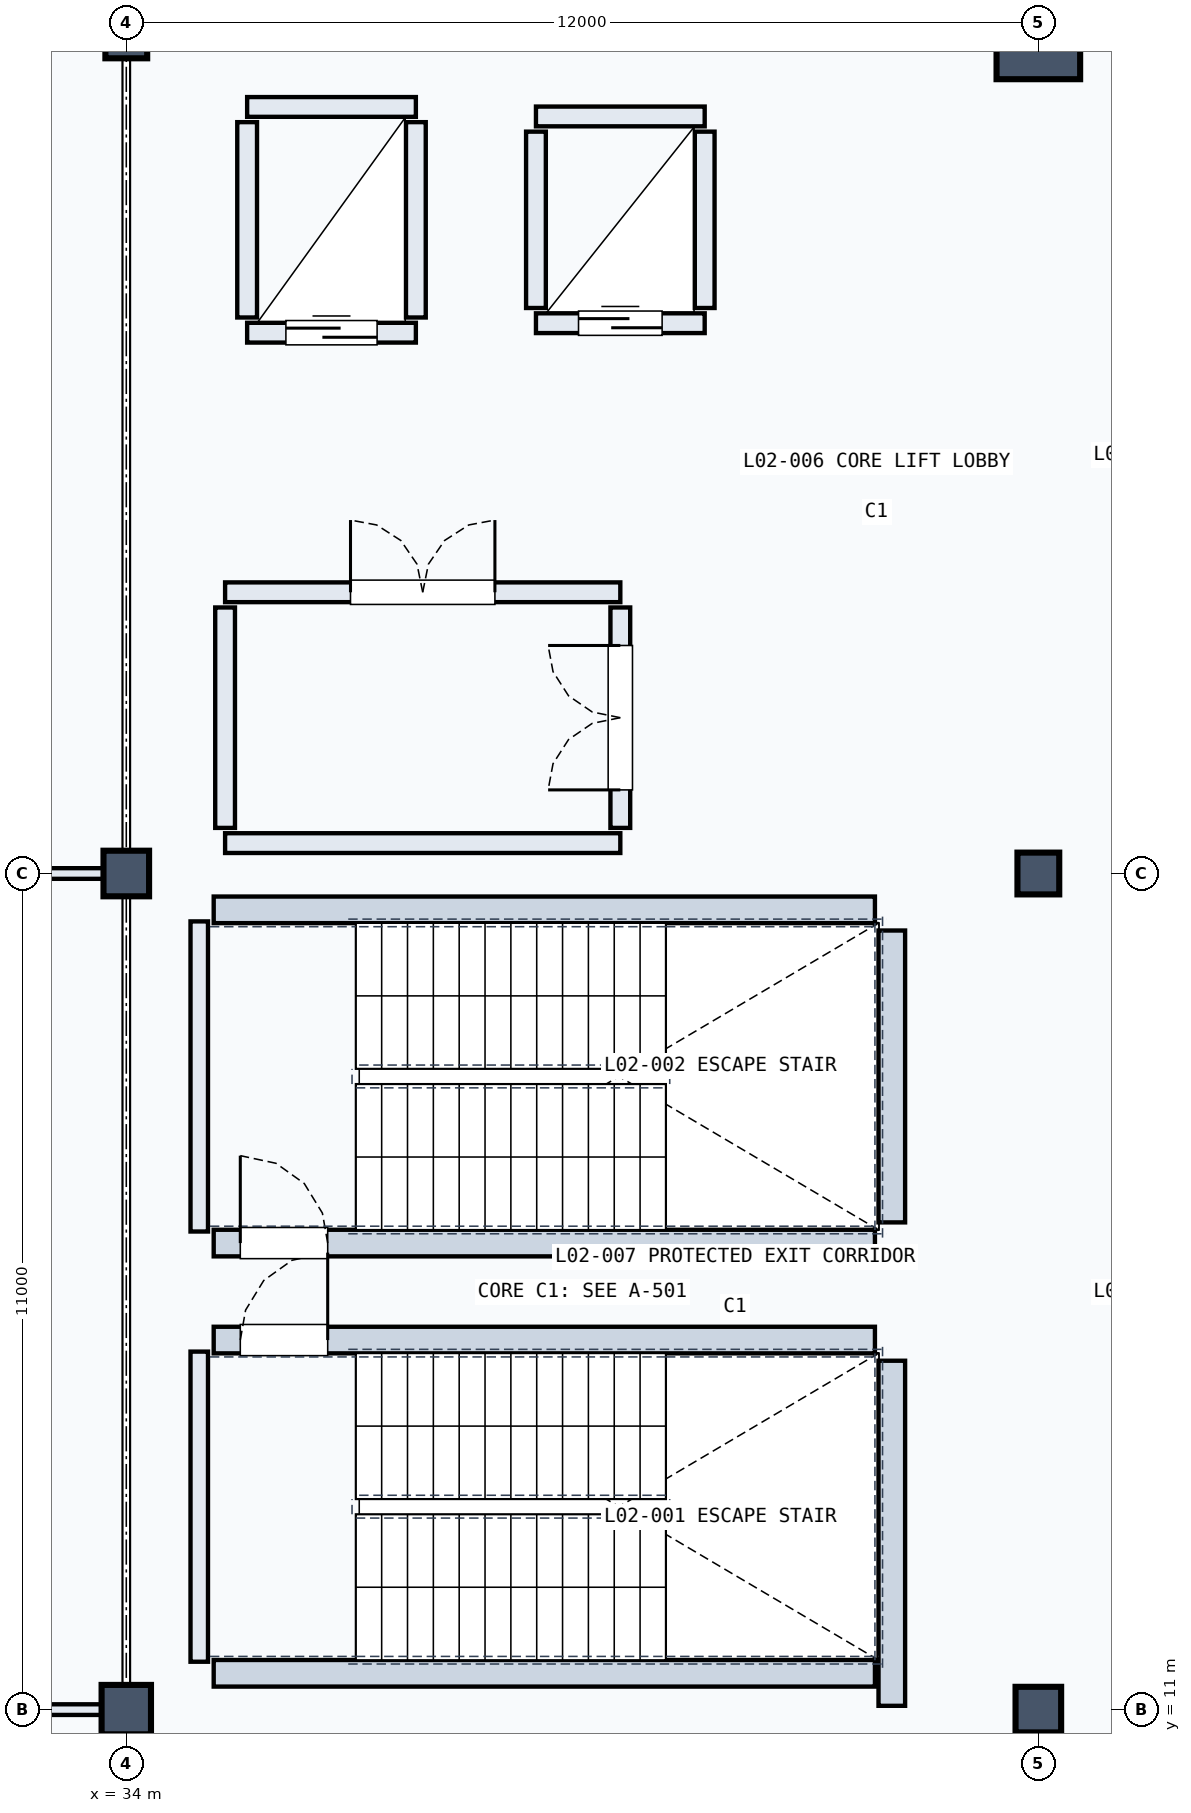
"""IFC4 building model, lengths in metres.
Left out: names, types, materials, properties, quantities, classifications, styles, units other than length and angle.
Written with IfcOpenShell. Run it as: python <this file> out.ifc"""

import sys

from ifc_helpers import new_model, si_unit, direction, frame, frame_2d, origin, origin_2d, place, context, subcontext, project, spatial, rectangle, extrude, element, fill, save


model = new_model("IFC4")
c1 = context("Model", 3, precision=1e-05, world=origin(), true_north=direction((0.0, 1.0)))
c2 = subcontext(c1, "Body", "Model", "MODEL_VIEW")
j1 = project(units=[si_unit("LENGTHUNIT", "METRE"), si_unit("PLANEANGLEUNIT", "RADIAN")], contexts=[c1])
p1 = place(None, origin())
s1 = spatial("IfcSite", under=j1, at=p1, CompositionType="ELEMENT")
p2 = place(p1, origin())
s2 = spatial("IfcBuilding", under=s1, at=p2, CompositionType="ELEMENT")
p3 = place(p2, frame((0.0, 0.0, 10.2)))
s3 = spatial("IfcBuildingStorey", under=s2, at=p3, CompositionType="ELEMENT", Elevation=10.2)
p4 = place(p3, frame((34.0, 11.0, 0.0), z_axis=(0.0, 0.0, 1.0), x_axis=(1.0, 0.0, 0.0)))
e1 = element("IfcColumn", 1, at=p4, inside=s3, PredefinedType="COLUMN", context=c2, shape_type="SweptSolid", body=[
    extrude(rectangle(XDim=0.65, YDim=0.65, at=origin_2d()), origin(), (0.0, 0.0, 1.0), 4.5),
])
p5 = place(p3, frame((34.0, 22.0, 0.0), z_axis=(0.0, 0.0, 1.0), x_axis=(1.0, 0.0, 0.0)))
e2 = element("IfcColumn", 2, at=p5, inside=s3, PredefinedType="COLUMN", context=c2, shape_type="SweptSolid", body=[
    extrude(rectangle(XDim=0.6, YDim=0.6, at=origin_2d()), origin(), (0.0, 0.0, 1.0), 4.5),
])
p6 = place(p3, frame((34.0, 33.0, 0.0), z_axis=(0.0, 0.0, 1.0), x_axis=(1.0, 0.0, 0.0)))
e3 = element("IfcColumn", 3, at=p6, inside=s3, PredefinedType="COLUMN", context=c2, shape_type="SweptSolid", body=[
    extrude(rectangle(XDim=0.55, YDim=0.55, at=origin_2d()), origin(), (0.0, 0.0, 1.0), 4.5),
])
p7 = place(p3, frame((46.0, 11.0, 0.0), z_axis=(0.0, 0.0, 1.0), x_axis=(1.0, 0.0, 0.0)))
e4 = element("IfcColumn", 4, at=p7, inside=s3, PredefinedType="COLUMN", context=c2, shape_type="SweptSolid", body=[
    extrude(rectangle(XDim=0.6, YDim=0.6, at=origin_2d()), origin(), (0.0, 0.0, 1.0), 4.5),
])
p8 = place(p3, frame((46.0, 22.0, 0.0), z_axis=(0.0, 0.0, 1.0), x_axis=(1.0, 0.0, 0.0)))
e5 = element("IfcColumn", 5, at=p8, inside=s3, PredefinedType="COLUMN", context=c2, shape_type="SweptSolid", body=[
    extrude(rectangle(XDim=0.55, YDim=0.55, at=origin_2d()), origin(), (0.0, 0.0, 1.0), 4.5),
])
p9 = place(p3, frame((46.0, 33.0, 0.0), z_axis=(0.0, 0.0, 1.0), x_axis=(1.0, 0.0, 0.0)))
e6 = element("IfcColumn", 6, at=p9, inside=s3, PredefinedType="COLUMN", context=c2, shape_type="SweptSolid", body=[
    extrude(rectangle(XDim=1.1, YDim=1.1, at=origin_2d()), origin(), (0.0, 0.0, 1.0), 4.5),
])
p10 = place(p3, frame((34.96, 11.63, 0.0), z_axis=(0.0, 0.0, 1.0), x_axis=(0.0, 1.0, 0.0)))
e7 = element("IfcWall", 7, at=p10, inside=s3, PredefinedType="SOLIDWALL", context=c2, shape_type="SweptSolid", body=[
    extrude(rectangle(XDim=4.08, YDim=0.23, at=frame_2d((2.04, 0.0))), origin(), (0.0, 0.0, 1.0), 4.14),
])
p11 = place(p3, frame((44.072, 11.05, 0.0), z_axis=(0.0, 0.0, 1.0), x_axis=(0.0, 1.0, 0.0)))
e8 = element("IfcWall", 8, at=p11, inside=s3, PredefinedType="SOLIDWALL", context=c2, shape_type="SweptSolid", body=[
    extrude(rectangle(XDim=4.54, YDim=0.35, at=frame_2d((2.27, 0.0))), origin(), (0.0, 0.0, 1.0), 4.14),
])
p12 = place(p3, frame((35.15, 11.478, 0.0), z_axis=(0.0, 0.0, 1.0), x_axis=(1.0, 0.0, 0.0)))
e9 = element("IfcWall", 9, at=p12, inside=s3, PredefinedType="SOLIDWALL", context=c2, shape_type="SweptSolid", body=[
    extrude(rectangle(XDim=8.7, YDim=0.35, at=frame_2d((4.35, 0.0))), origin(), (0.0, 0.0, 1.0), 4.14),
])
p13 = place(p3, frame((35.15, 15.862, 0.0), z_axis=(0.0, 0.0, 1.0), x_axis=(1.0, 0.0, 0.0)))
e10 = element("IfcWall", 10, at=p13, inside=s3, PredefinedType="SOLIDWALL", context=c2, shape_type="SweptSolid", body=[
    extrude(rectangle(XDim=8.7, YDim=0.35, at=frame_2d((4.35, 0.0))), origin(), (0.0, 0.0, 1.0), 4.14),
])
p14 = place(p13, frame((0.35, 0.0, 0.0)))
e11 = element("IfcOpeningElement", 11, at=p14, cuts=e10, PredefinedType="OPENING", context=c2, shape_type="SweptSolid", body=[
    extrude(rectangle(XDim=1.15, YDim=2.2, at=frame_2d((0.575, 1.1))), frame((0.0, 0.185, 0.0), z_axis=(0.0, -1.0, 0.0), x_axis=(1.0, 0.0, 0.0)), (0.0, 0.0, 1.0), 0.37),
])
p15 = place(p3, frame((34.96, 17.29, 0.0), z_axis=(0.0, 0.0, 1.0), x_axis=(0.0, 1.0, 0.0)))
e12 = element("IfcWall", 12, at=p15, inside=s3, PredefinedType="SOLIDWALL", context=c2, shape_type="SweptSolid", body=[
    extrude(rectangle(XDim=4.08, YDim=0.23, at=frame_2d((2.04, 0.0))), origin(), (0.0, 0.0, 1.0), 4.14),
])
p16 = place(p3, frame((44.072, 17.41, 0.0), z_axis=(0.0, 0.0, 1.0), x_axis=(0.0, 1.0, 0.0)))
e13 = element("IfcWall", 13, at=p16, inside=s3, PredefinedType="SOLIDWALL", context=c2, shape_type="SweptSolid", body=[
    extrude(rectangle(XDim=3.84, YDim=0.35, at=frame_2d((1.92, 0.0))), origin(), (0.0, 0.0, 1.0), 4.14),
])
p17 = place(p3, frame((35.15, 17.138, 0.0), z_axis=(0.0, 0.0, 1.0), x_axis=(1.0, 0.0, 0.0)))
e14 = element("IfcWall", 14, at=p17, inside=s3, PredefinedType="SOLIDWALL", context=c2, shape_type="SweptSolid", body=[
    extrude(rectangle(XDim=8.7, YDim=0.35, at=frame_2d((4.35, 0.0))), origin(), (0.0, 0.0, 1.0), 4.14),
])
p18 = place(p17, frame((0.35, 0.0, 0.0)))
e15 = element("IfcOpeningElement", 15, at=p18, cuts=e14, PredefinedType="OPENING", context=c2, shape_type="SweptSolid", body=[
    extrude(rectangle(XDim=1.15, YDim=2.2, at=frame_2d((0.575, 1.1))), frame((0.0, 0.185, 0.0), z_axis=(0.0, -1.0, 0.0), x_axis=(1.0, 0.0, 0.0)), (0.0, 0.0, 1.0), 0.37),
])
p19 = place(p3, frame((35.15, 21.522, 0.0), z_axis=(0.0, 0.0, 1.0), x_axis=(1.0, 0.0, 0.0)))
e16 = element("IfcWall", 16, at=p19, inside=s3, PredefinedType="SOLIDWALL", context=c2, shape_type="SweptSolid", body=[
    extrude(rectangle(XDim=8.7, YDim=0.35, at=frame_2d((4.35, 0.0))), origin(), (0.0, 0.0, 1.0), 4.14),
])
p20 = place(p3, frame((35.59, 29.115, 0.0), z_axis=(0.0, 0.0, 1.0), x_axis=(1.0, 0.0, 0.0)))
e17 = element("IfcWall", 17, at=p20, inside=s3, PredefinedType="SOLIDWALL", context=c2, shape_type="SweptSolid", body=[
    extrude(rectangle(XDim=2.22, YDim=0.26, at=frame_2d((1.11, 0.0))), origin(), (0.0, 0.0, 1.0), 4.14),
])
p21 = place(p20, frame((0.51, 0.0, 0.0)))
e18 = element("IfcOpeningElement", 18, at=p21, cuts=e17, PredefinedType="OPENING", context=c2, shape_type="SweptSolid", body=[
    extrude(rectangle(XDim=1.2, YDim=2.2, at=frame_2d((0.6, 1.1))), frame((0.0, 0.14, 0.0), z_axis=(0.0, -1.0, 0.0), x_axis=(1.0, 0.0, 0.0)), (0.0, 0.0, 1.0), 0.28),
])
p22 = place(p3, frame((35.59, 32.085, 0.0), z_axis=(0.0, 0.0, 1.0), x_axis=(1.0, 0.0, 0.0)))
e19 = element("IfcWall", 19, at=p22, inside=s3, PredefinedType="SOLIDWALL", context=c2, shape_type="SweptSolid", body=[
    extrude(rectangle(XDim=2.22, YDim=0.26, at=frame_2d((1.11, 0.0))), origin(), (0.0, 0.0, 1.0), 4.14),
])
for number, where, z_axis, x_axis in (
    (20, (35.59, 29.315, 0.0), (0.0, 0.0, 1.0), (0.0, 1.0, 0.0)),
    (21, (37.81, 29.315, 0.0), (0.0, 0.0, 1.0), (0.0, 1.0, 0.0)),
):
    element("IfcWall", number, at=place(p3, frame(where, z_axis=z_axis, x_axis=x_axis)), inside=s3, PredefinedType="SOLIDWALL", context=c2, shape_type="SweptSolid", body=[
        extrude(rectangle(XDim=2.57, YDim=0.26, at=frame_2d((1.285, 0.0))), origin(), (0.0, 0.0, 1.0), 4.14),
    ])
p23 = place(p3, frame((39.39, 29.24, 0.0), z_axis=(0.0, 0.0, 1.0), x_axis=(1.0, 0.0, 0.0)))
e22 = element("IfcWall", 22, at=p23, inside=s3, PredefinedType="SOLIDWALL", context=c2, shape_type="SweptSolid", body=[
    extrude(rectangle(XDim=2.22, YDim=0.26, at=frame_2d((1.11, 0.0))), origin(), (0.0, 0.0, 1.0), 4.14),
])
p24 = place(p23, frame((0.56, 0.0, 0.0)))
e23 = element("IfcOpeningElement", 23, at=p24, cuts=e22, PredefinedType="OPENING", context=c2, shape_type="SweptSolid", body=[
    extrude(rectangle(XDim=1.1, YDim=2.15, at=frame_2d((0.55, 1.075))), frame((0.0, 0.14, 0.0), z_axis=(0.0, -1.0, 0.0), x_axis=(1.0, 0.0, 0.0)), (0.0, 0.0, 1.0), 0.28),
])
p25 = place(p3, frame((39.39, 31.96, 0.0), z_axis=(0.0, 0.0, 1.0), x_axis=(1.0, 0.0, 0.0)))
e24 = element("IfcWall", 24, at=p25, inside=s3, PredefinedType="SOLIDWALL", context=c2, shape_type="SweptSolid", body=[
    extrude(rectangle(XDim=2.22, YDim=0.26, at=frame_2d((1.11, 0.0))), origin(), (0.0, 0.0, 1.0), 4.14),
])
for number, where, z_axis, x_axis in (
    (25, (39.39, 29.44, 0.0), (0.0, 0.0, 1.0), (0.0, 1.0, 0.0)),
    (26, (41.61, 29.44, 0.0), (0.0, 0.0, 1.0), (0.0, 1.0, 0.0)),
):
    element("IfcWall", number, at=place(p3, frame(where, z_axis=z_axis, x_axis=x_axis)), inside=s3, PredefinedType="SOLIDWALL", context=c2, shape_type="SweptSolid", body=[
        extrude(rectangle(XDim=2.32, YDim=0.26, at=frame_2d((1.16, 0.0))), origin(), (0.0, 0.0, 1.0), 4.14),
    ])
p26 = place(p3, frame((35.3, 25.7, 0.0), z_axis=(0.0, 0.0, 1.0), x_axis=(1.0, 0.0, 0.0)))
e27 = element("IfcWall", 27, at=p26, inside=s3, PredefinedType="SOLIDWALL", context=c2, shape_type="SweptSolid", body=[
    extrude(rectangle(XDim=5.2, YDim=0.26, at=frame_2d((2.6, 0.0))), origin(), (0.0, 0.0, 1.0), 4.14),
])
p27 = place(p26, frame((1.65, 0.0, 0.0)))
e28 = element("IfcOpeningElement", 28, at=p27, cuts=e27, PredefinedType="OPENING", context=c2, shape_type="SweptSolid", body=[
    extrude(rectangle(XDim=1.9, YDim=2.2, at=frame_2d((0.95, 1.1))), frame((0.0, 0.14, 0.0), z_axis=(0.0, -1.0, 0.0), x_axis=(1.0, 0.0, 0.0)), (0.0, 0.0, 1.0), 0.28),
])
p28 = place(p3, frame((35.3, 22.4, 0.0), z_axis=(0.0, 0.0, 1.0), x_axis=(1.0, 0.0, 0.0)))
e29 = element("IfcWall", 29, at=p28, inside=s3, PredefinedType="SOLIDWALL", context=c2, shape_type="SweptSolid", body=[
    extrude(rectangle(XDim=5.2, YDim=0.26, at=frame_2d((2.6, 0.0))), origin(), (0.0, 0.0, 1.0), 3.59),
])
p29 = place(p3, frame((35.3, 22.6, 0.0), z_axis=(0.0, 0.0, 1.0), x_axis=(0.0, 1.0, 0.0)))
e30 = element("IfcWall", 30, at=p29, inside=s3, PredefinedType="SOLIDWALL", context=c2, shape_type="SweptSolid", body=[
    extrude(rectangle(XDim=2.9, YDim=0.26, at=frame_2d((1.45, 0.0))), origin(), (0.0, 0.0, 1.0), 4.14),
])
p30 = place(p3, frame((40.5, 22.6, 0.0), z_axis=(0.0, 0.0, 1.0), x_axis=(0.0, 1.0, 0.0)))
e31 = element("IfcWall", 31, at=p30, inside=s3, PredefinedType="SOLIDWALL", context=c2, shape_type="SweptSolid", body=[
    extrude(rectangle(XDim=2.9, YDim=0.26, at=frame_2d((1.45, 0.0))), origin(), (0.0, 0.0, 1.0), 4.14),
])
p31 = place(p30, frame((0.5, 0.0, 0.0)))
e32 = element("IfcOpeningElement", 32, at=p31, cuts=e31, PredefinedType="OPENING", context=c2, shape_type="SweptSolid", body=[
    extrude(rectangle(XDim=1.9, YDim=2.2, at=frame_2d((0.95, 1.1))), frame((0.0, 0.14, 0.0), z_axis=(0.0, -1.0, 0.0), x_axis=(1.0, 0.0, 0.0)), (0.0, 0.0, 1.0), 0.28),
])
for number, where, z_axis, x_axis in (
    (33, (22.48, 11.0, 0.0), (0.0, 0.0, 1.0), (1.0, 0.0, 0.0)),
    (34, (22.48, 22.0, 0.0), (0.0, 0.0, 1.0), (1.0, 0.0, 0.0)),
):
    element("IfcWall", number, at=place(p3, frame(where, z_axis=z_axis, x_axis=x_axis)), inside=s3, PredefinedType="PARTITIONING", context=c2, shape_type="SweptSolid", body=[
        extrude(rectangle(XDim=11.3, YDim=0.14, at=frame_2d((5.65, 0.0))), origin(), (0.0, 0.0, 1.0), 3.405),
    ])
p32 = place(p3, frame((46.0, 0.48, 0.0), z_axis=(0.0, 0.0, 1.0), x_axis=(0.0, 1.0, 0.0)))
e35 = element("IfcWall", 35, at=p32, inside=s3, PredefinedType="PARTITIONING", context=c2, shape_type="SweptSolid", body=[
    extrude(rectangle(XDim=10.3, YDim=0.24, at=frame_2d((5.15, 0.0))), origin(), (0.0, 0.0, 1.0), 3.39),
])
p33 = place(p32, frame((4.31, 0.0, 0.0)))
e36 = element("IfcOpeningElement", 36, at=p33, cuts=e35, PredefinedType="OPENING", context=c2, shape_type="SweptSolid", body=[
    extrude(rectangle(XDim=1.68, YDim=2.2, at=frame_2d((0.84, 1.1))), frame((0.0, 0.13, 0.0), z_axis=(0.0, -1.0, 0.0), x_axis=(1.0, 0.0, 0.0)), (0.0, 0.0, 1.0), 0.26),
])
p34 = place(p3, frame((34.0, 0.48, 0.0), z_axis=(0.0, 0.0, 1.0), x_axis=(0.0, 1.0, 0.0)))
e37 = element("IfcWall", 37, at=p34, inside=s3, PredefinedType="PARTITIONING", context=c2, shape_type="SweptSolid", body=[
    extrude(rectangle(XDim=10.3, YDim=0.18, at=frame_2d((5.15, 0.0))), origin(), (0.0, 0.0, 1.0), 3.405),
])
p35 = place(p14, origin())
e38 = element("IfcDoor", 38, at=p35, inside=s3, OperationType="SINGLE_SWING_RIGHT", PredefinedType="DOOR", context=c2, shape_type="SweptSolid", body=[
    extrude(rectangle(XDim=1.15, YDim=2.2, at=frame_2d((0.575, 1.1))), frame((0.0, 0.025, 0.0), z_axis=(0.0, -1.0, 0.0), x_axis=(1.0, 0.0, 0.0)), (0.0, 0.0, 1.0), 0.05),
])
fill(e11, e38)
p36 = place(p18, origin())
e39 = element("IfcDoor", 39, at=p36, inside=s3, OperationType="SINGLE_SWING_LEFT", PredefinedType="DOOR", context=c2, shape_type="SweptSolid", body=[
    extrude(rectangle(XDim=1.15, YDim=2.2, at=frame_2d((0.575, 1.1))), frame((0.0, 0.025, 0.0), z_axis=(0.0, -1.0, 0.0), x_axis=(1.0, 0.0, 0.0)), (0.0, 0.0, 1.0), 0.05),
])
fill(e15, e39)
p37 = place(p21, origin())
e40 = element("IfcDoor", 40, at=p37, inside=s3, OperationType="SLIDING_TO_LEFT", PredefinedType="DOOR", context=c2, shape_type="SweptSolid", body=[
    extrude(rectangle(XDim=1.2, YDim=2.2, at=frame_2d((0.6, 1.1))), frame((0.0, 0.025, 0.0), z_axis=(0.0, -1.0, 0.0), x_axis=(1.0, 0.0, 0.0)), (0.0, 0.0, 1.0), 0.05),
])
fill(e18, e40)
p38 = place(p24, origin())
e41 = element("IfcDoor", 41, at=p38, inside=s3, OperationType="SLIDING_TO_LEFT", PredefinedType="DOOR", context=c2, shape_type="SweptSolid", body=[
    extrude(rectangle(XDim=1.1, YDim=2.15, at=frame_2d((0.55, 1.075))), frame((0.0, 0.025, 0.0), z_axis=(0.0, -1.0, 0.0), x_axis=(1.0, 0.0, 0.0)), (0.0, 0.0, 1.0), 0.05),
])
fill(e23, e41)
p39 = place(p27, origin())
e42 = element("IfcDoor", 42, at=p39, inside=s3, OperationType="DOUBLE_DOOR_SINGLE_SWING", PredefinedType="DOOR", context=c2, shape_type="SweptSolid", body=[
    extrude(rectangle(XDim=1.9, YDim=2.2, at=frame_2d((0.95, 1.1))), frame((0.0, 0.025, 0.0), z_axis=(0.0, -1.0, 0.0), x_axis=(1.0, 0.0, 0.0)), (0.0, 0.0, 1.0), 0.05),
])
fill(e28, e42)
p40 = place(p31, origin())
e43 = element("IfcDoor", 43, at=p40, inside=s3, OperationType="DOUBLE_DOOR_SINGLE_SWING", PredefinedType="DOOR", context=c2, shape_type="SweptSolid", body=[
    extrude(rectangle(XDim=1.9, YDim=2.2, at=frame_2d((0.95, 1.1))), frame((0.0, 0.025, 0.0), z_axis=(0.0, -1.0, 0.0), x_axis=(1.0, 0.0, 0.0)), (0.0, 0.0, 1.0), 0.05),
])
fill(e32, e43)
save(model, sys.argv[1])
